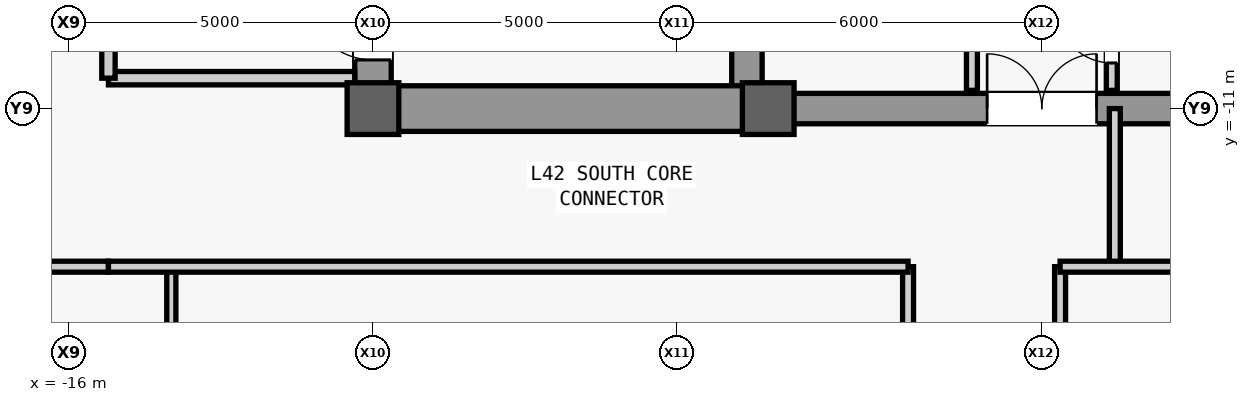
"""IFC4 building model, lengths in metres.
Left out: names, types, materials, properties, quantities, classifications, styles, units other than length and angle.
Written with IfcOpenShell. Run it as: python <this file> out.ifc"""

import sys

from ifc_helpers import new_model, si_unit, direction, frame, frame_2d, origin, origin_2d, place, context, subcontext, project, spatial, rectangle, extrude, source, transform, mapped, element, fill, save


model = new_model("IFC4")
c1 = context("Model", 3, precision=1e-05, world=origin(), true_north=direction((0.0, 1.0)))
c2 = subcontext(c1, "Body", "Model", "MODEL_VIEW")
j1 = project(units=[si_unit("LENGTHUNIT", "METRE"), si_unit("PLANEANGLEUNIT", "RADIAN")], contexts=[c1])
p1 = place(None, origin())
s1 = spatial("IfcSite", under=j1, at=p1, CompositionType="ELEMENT")
p2 = place(p1, origin())
s2 = spatial("IfcBuilding", under=s1, at=p2, CompositionType="ELEMENT")
p3 = place(p2, frame((0.0, 0.0, 183.1)))
s3 = spatial("IfcBuildingStorey", under=s2, at=p3, CompositionType="ELEMENT", Elevation=183.1)
m1 = source(origin(), c2, "Body", "SweptSolid", [
    extrude(rectangle(XDim=22.0, YDim=0.6, at=frame_2d((11.0, 0.0))), origin(), (0.0, 0.0, 1.0), 3.78),
])
p4 = place(p3, frame((-11.0, -11.0, 0.0), z_axis=(0.0, 0.0, 1.0), x_axis=(0.0, 1.0, 0.0)))
e1 = element("IfcWall", 1, at=p4, inside=s3, PredefinedType="SHEAR", context=c2, shape_type="MappedRepresentation", body=[
    mapped(m1, transform((0.0, 0.0, 0.0), scale=1.0)),
])
m2 = source(origin(), c2, "Body", "SweptSolid", [
    extrude(rectangle(XDim=1.1, YDim=2.2, at=frame_2d((0.55, 1.1))), frame((0.0, 0.31, 0.0), z_axis=(0.0, -1.0, 0.0), x_axis=(1.0, 0.0, 0.0)), (0.0, 0.0, 1.0), 0.62),
])
p5 = place(p4, frame((0.8, 0.0, 0.0)))
e2 = element("IfcOpeningElement", 2, at=p5, cuts=e1, PredefinedType="OPENING", context=c2, shape_type="MappedRepresentation", body=[
    mapped(m2, transform((0.0, 0.0, 0.0), scale=1.0)),
])
p6 = place(p4, frame((12.5, 0.0, 0.0)))
e3 = element("IfcOpeningElement", 3, at=p6, cuts=e1, PredefinedType="OPENING", context=c2, shape_type="MappedRepresentation", body=[
    mapped(m2, transform((0.0, 0.0, 0.0), scale=1.0)),
])
m3 = source(origin(), c2, "Body", "SweptSolid", [
    extrude(rectangle(XDim=0.9, YDim=2.15, at=frame_2d((0.45, 1.075))), frame((0.0, 0.31, 0.0), z_axis=(0.0, -1.0, 0.0), x_axis=(1.0, 0.0, 0.0)), (0.0, 0.0, 1.0), 0.62),
])
p7 = place(p4, frame((6.2, 0.0, 0.0)))
e4 = element("IfcOpeningElement", 4, at=p7, cuts=e1, PredefinedType="OPENING", context=c2, shape_type="MappedRepresentation", body=[
    mapped(m3, transform((0.0, 0.0, 0.0), scale=1.0)),
])
p8 = place(p4, frame((8.05, 0.0, 0.0)))
e5 = element("IfcOpeningElement", 5, at=p8, cuts=e1, PredefinedType="OPENING", context=c2, shape_type="MappedRepresentation", body=[
    mapped(m3, transform((0.0, 0.0, 0.0), scale=1.0)),
])
m4 = source(origin(), c2, "Body", "SweptSolid", [
    extrude(rectangle(XDim=1.3, YDim=2.3, at=frame_2d((0.65, 1.15))), frame((0.0, 0.31, 0.0), z_axis=(0.0, -1.0, 0.0), x_axis=(1.0, 0.0, 0.0)), (0.0, 0.0, 1.0), 0.62),
])
p9 = place(p4, frame((2.7, 0.0, 0.0)))
e6 = element("IfcOpeningElement", 6, at=p9, cuts=e1, PredefinedType="OPENING", context=c2, shape_type="MappedRepresentation", body=[
    mapped(m4, transform((0.0, 0.0, 0.0), scale=1.0)),
])
m5 = source(origin(), c2, "Body", "SweptSolid", [
    extrude(rectangle(XDim=21.4, YDim=0.5, at=frame_2d((10.7, 0.0))), origin(), (0.0, 0.0, 1.0), 3.78),
])
p10 = place(p3, frame((-4.85, -10.7, 0.0), z_axis=(0.0, 0.0, 1.0), x_axis=(0.0, 1.0, 0.0)))
e7 = element("IfcWall", 7, at=p10, inside=s3, PredefinedType="SHEAR", context=c2, shape_type="MappedRepresentation", body=[
    mapped(m5, transform((0.0, 0.0, 0.0), scale=1.0)),
])
m6 = source(origin(), c2, "Body", "SweptSolid", [
    extrude(rectangle(XDim=5.85, YDim=0.75, at=frame_2d((2.925, 0.0))), origin(), (0.0, 0.0, 1.0), 3.78),
])
p11 = place(p3, frame((-10.7, -11.0, 0.0), z_axis=(0.0, 0.0, 1.0), x_axis=(1.0, 0.0, 0.0)))
e8 = element("IfcWall", 8, at=p11, inside=s3, PredefinedType="SHEAR", context=c2, shape_type="MappedRepresentation", body=[
    mapped(m6, transform((0.0, 0.0, 0.0), scale=1.0)),
])
m7 = source(origin(), c2, "Body", "SweptSolid", [
    extrude(rectangle(XDim=9.2, YDim=0.5, at=frame_2d((4.6, 0.0))), origin(), (0.0, 0.0, 1.0), 3.78),
])
p12 = place(p3, frame((-4.6, -11.0, 0.0), z_axis=(0.0, 0.0, 1.0), x_axis=(1.0, 0.0, 0.0)))
e9 = element("IfcWall", 9, at=p12, inside=s3, PredefinedType="SHEAR", context=c2, shape_type="MappedRepresentation", body=[
    mapped(m7, transform((0.0, 0.0, 0.0), scale=1.0)),
])
m8 = source(origin(), c2, "Body", "SweptSolid", [
    extrude(rectangle(XDim=1.8, YDim=2.25, at=frame_2d((0.9, 1.125))), frame((0.0, 0.26, 0.0), z_axis=(0.0, -1.0, 0.0), x_axis=(1.0, 0.0, 0.0)), (0.0, 0.0, 1.0), 0.52),
])
p13 = place(p12, frame((3.7, 0.0, 0.0)))
e10 = element("IfcOpeningElement", 10, at=p13, cuts=e9, PredefinedType="OPENING", context=c2, shape_type="MappedRepresentation", body=[
    mapped(m8, transform((0.0, 0.0, 0.0), scale=1.0)),
])
m9 = source(origin(), c2, "Body", "SweptSolid", [
    extrude(rectangle(XDim=0.85, YDim=0.85, at=origin_2d()), origin(), (0.0, 0.0, 1.0), 4.0),
])
for number, where, z_axis, x_axis in (
    (11, (-11.0, -11.0, 0.0), (0.0, 0.0, 1.0), (1.0, 0.0, 0.0)),
    (12, (-4.5, -11.0, 0.0), (0.0, 0.0, 1.0), (1.0, 0.0, 0.0)),
):
    element("IfcColumn", number, at=place(p3, frame(where, z_axis=z_axis, x_axis=x_axis)), inside=s3, PredefinedType="COLUMN", context=c2, shape_type="MappedRepresentation", body=[
        mapped(m9, transform((0.0, 0.0, 0.0), scale=1.0)),
    ])
m10 = source(origin(), c2, "Body", "SweptSolid", [
    extrude(rectangle(XDim=4.05, YDim=0.22, at=frame_2d((2.025, 0.0))), origin(), (0.0, 0.0, 1.0), 3.78),
])
p14 = place(p3, frame((-15.35, -10.5, 0.0), z_axis=(0.0, 0.0, 1.0), x_axis=(1.0, 0.0, 0.0)))
e13 = element("IfcWall", 13, at=p14, inside=s3, PredefinedType="PARTITIONING", context=c2, shape_type="MappedRepresentation", body=[
    mapped(m10, transform((0.0, 0.0, 0.0), scale=1.0)),
])
m11 = source(origin(), c2, "Body", "SweptSolid", [
    extrude(rectangle(XDim=4.4, YDim=0.22, at=frame_2d((2.2, 0.0))), origin(), (0.0, 0.0, 1.0), 3.78),
])
p15 = place(p3, frame((-15.35, -10.5, 0.0), z_axis=(0.0, 0.0, 1.0), x_axis=(0.0, 1.0, 0.0)))
e14 = element("IfcWall", 14, at=p15, inside=s3, PredefinedType="PARTITIONING", context=c2, shape_type="MappedRepresentation", body=[
    mapped(m11, transform((0.0, 0.0, 0.0), scale=1.0)),
])
m12 = source(origin(), c2, "Body", "SweptSolid", [
    extrude(rectangle(XDim=1.2, YDim=2.2, at=frame_2d((0.6, 1.1))), frame((0.0, 0.12, 0.0), z_axis=(0.0, -1.0, 0.0), x_axis=(1.0, 0.0, 0.0)), (0.0, 0.0, 1.0), 0.24),
])
p16 = place(p15, frame((1.6, 0.0, 0.0)))
e15 = element("IfcOpeningElement", 15, at=p16, cuts=e14, PredefinedType="OPENING", context=c2, shape_type="MappedRepresentation", body=[
    mapped(m12, transform((0.0, 0.0, 0.0), scale=1.0)),
])
m13 = source(origin(), c2, "Body", "SweptSolid", [
    extrude(rectangle(XDim=5.4, YDim=0.18, at=frame_2d((2.7, 0.0))), origin(), (0.0, 0.0, 1.0), 3.78),
])
p17 = place(p3, frame((-1.15, -10.7, 0.0), z_axis=(0.0, 0.0, 1.0), x_axis=(0.0, 1.0, 0.0)))
e16 = element("IfcWall", 16, at=p17, inside=s3, PredefinedType="PARTITIONING", context=c2, shape_type="MappedRepresentation", body=[
    mapped(m13, transform((0.0, 0.0, 0.0), scale=1.0)),
])
m14 = source(origin(), c2, "Body", "SweptSolid", [
    extrude(rectangle(XDim=0.9, YDim=2.15, at=frame_2d((0.45, 1.075))), frame((0.0, 0.1, 0.0), z_axis=(0.0, -1.0, 0.0), x_axis=(1.0, 0.0, 0.0)), (0.0, 0.0, 1.0), 0.2),
])
p18 = place(p17, frame((2.25, 0.0, 0.0)))
e17 = element("IfcOpeningElement", 17, at=p18, cuts=e16, PredefinedType="OPENING", context=c2, shape_type="MappedRepresentation", body=[
    mapped(m14, transform((0.0, 0.0, 0.0), scale=1.0)),
])
p19 = place(p3, frame((1.15, -10.7, 0.0), z_axis=(0.0, 0.0, 1.0), x_axis=(0.0, 1.0, 0.0)))
e18 = element("IfcWall", 18, at=p19, inside=s3, PredefinedType="PARTITIONING", context=c2, shape_type="MappedRepresentation", body=[
    mapped(m13, transform((0.0, 0.0, 0.0), scale=1.0)),
])
p20 = place(p19, frame((0.45, 0.0, 0.0)))
e19 = element("IfcOpeningElement", 19, at=p20, cuts=e18, PredefinedType="OPENING", context=c2, shape_type="MappedRepresentation", body=[
    mapped(m14, transform((0.0, 0.0, 0.0), scale=1.0)),
])
p21 = place(p19, frame((2.25, 0.0, 0.0)))
e20 = element("IfcOpeningElement", 20, at=p21, cuts=e18, PredefinedType="OPENING", context=c2, shape_type="MappedRepresentation", body=[
    mapped(m14, transform((0.0, 0.0, 0.0), scale=1.0)),
])
p22 = place(p19, frame((4.05, 0.0, 0.0)))
e21 = element("IfcOpeningElement", 21, at=p22, cuts=e18, PredefinedType="OPENING", context=c2, shape_type="MappedRepresentation", body=[
    mapped(m14, transform((0.0, 0.0, 0.0), scale=1.0)),
])
m15 = source(origin(), c2, "Body", "SweptSolid", [
    extrude(rectangle(XDim=2.45, YDim=0.18, at=frame_2d((1.225, 0.0))), origin(), (0.0, 0.0, 1.0), 3.78),
])
p23 = place(p3, frame((-17.8, -13.6, 0.0), z_axis=(0.0, 0.0, 1.0), x_axis=(1.0, 0.0, 0.0)))
e22 = element("IfcWall", 22, at=p23, inside=s3, PredefinedType="PARTITIONING", context=c2, shape_type="MappedRepresentation", body=[
    mapped(m15, transform((0.0, 0.0, 0.0), scale=1.0)),
])
m16 = source(origin(), c2, "Body", "SweptSolid", [
    extrude(rectangle(XDim=2.6, YDim=0.18, at=frame_2d((1.3, 0.0))), origin(), (0.0, 0.0, 1.0), 3.78),
])
p24 = place(p3, frame((1.2, -13.6, 0.0), z_axis=(0.0, 0.0, 1.0), x_axis=(0.0, 1.0, 0.0)))
e23 = element("IfcWall", 23, at=p24, inside=s3, PredefinedType="PARTITIONING", context=c2, shape_type="MappedRepresentation", body=[
    mapped(m16, transform((0.0, 0.0, 0.0), scale=1.0)),
])
m17 = source(origin(), c2, "Body", "SweptSolid", [
    extrude(rectangle(XDim=16.4, YDim=0.15, at=frame_2d((8.2, 0.0))), origin(), (0.0, 0.0, 1.0), 3.78),
])
p25 = place(p3, frame((-14.316, -30.0, 0.0), z_axis=(0.0, 0.0, 1.0), x_axis=(0.0, 1.0, 0.0)))
e24 = element("IfcWall", 24, at=p25, inside=s3, PredefinedType="PARTITIONING", context=c2, shape_type="MappedRepresentation", body=[
    mapped(m17, transform((0.0, 0.0, 0.0), scale=1.0)),
])
m18 = source(origin(), c2, "Body", "SweptSolid", [
    extrude(rectangle(XDim=0.95, YDim=2.15, at=frame_2d((0.475, 1.075))), frame((0.0, 0.085, 0.0), z_axis=(0.0, -1.0, 0.0), x_axis=(1.0, 0.0, 0.0)), (0.0, 0.0, 1.0), 0.17),
])
p26 = place(p25, frame((11.825, 0.0, 0.0)))
e25 = element("IfcOpeningElement", 25, at=p26, cuts=e24, PredefinedType="OPENING", context=c2, shape_type="MappedRepresentation", body=[
    mapped(m18, transform((0.0, 0.0, 0.0), scale=1.0)),
])
m19 = source(origin(), c2, "Body", "SweptSolid", [
    extrude(rectangle(XDim=16.4, YDim=0.18, at=frame_2d((8.2, 0.0))), origin(), (0.0, 0.0, 1.0), 3.78),
])
p27 = place(p3, frame((-2.2, -30.0, 0.0), z_axis=(0.0, 0.0, 1.0), x_axis=(0.0, 1.0, 0.0)))
e26 = element("IfcWall", 26, at=p27, inside=s3, PredefinedType="PARTITIONING", context=c2, shape_type="MappedRepresentation", body=[
    mapped(m19, transform((0.0, 0.0, 0.0), scale=1.0)),
])
m20 = source(origin(), c2, "Body", "SweptSolid", [
    extrude(rectangle(XDim=1.05, YDim=2.2, at=frame_2d((0.525, 1.1))), frame((0.0, 0.1, 0.0), z_axis=(0.0, -1.0, 0.0), x_axis=(1.0, 0.0, 0.0)), (0.0, 0.0, 1.0), 0.2),
])
p28 = place(p27, frame((3.575, 0.0, 0.0)))
e27 = element("IfcOpeningElement", 27, at=p28, cuts=e26, PredefinedType="OPENING", context=c2, shape_type="MappedRepresentation", body=[
    mapped(m20, transform((0.0, 0.0, 0.0), scale=1.0)),
])
m21 = source(origin(), c2, "Body", "SweptSolid", [
    extrude(rectangle(XDim=13.15, YDim=0.18, at=frame_2d((6.575, 0.0))), origin(), (0.0, 0.0, 1.0), 3.78),
])
p29 = place(p3, frame((-15.35, -13.6, 0.0), z_axis=(0.0, 0.0, 1.0), x_axis=(1.0, 0.0, 0.0)))
e28 = element("IfcWall", 28, at=p29, inside=s3, PredefinedType="PARTITIONING", context=c2, shape_type="MappedRepresentation", body=[
    mapped(m21, transform((0.0, 0.0, 0.0), scale=1.0)),
])
m22 = source(origin(), c2, "Body", "SweptSolid", [
    extrude(rectangle(XDim=16.4, YDim=0.18, at=frame_2d((8.2, 0.0))), origin(), (0.0, 0.0, 1.0), 3.007),
])
p30 = place(p3, frame((0.3, -30.0, 0.0), z_axis=(0.0, 0.0, 1.0), x_axis=(0.0, 1.0, 0.0)))
e29 = element("IfcWall", 29, at=p30, inside=s3, PredefinedType="PARTITIONING", context=c2, shape_type="MappedRepresentation", body=[
    mapped(m22, transform((0.0, 0.0, 0.0), scale=1.0)),
])
p31 = place(p30, frame((3.575, 0.0, 0.0)))
e30 = element("IfcOpeningElement", 30, at=p31, cuts=e29, PredefinedType="OPENING", context=c2, shape_type="MappedRepresentation", body=[
    mapped(m20, transform((0.0, 0.0, 0.0), scale=1.0)),
])
m23 = source(origin(), c2, "Body", "SweptSolid", [
    extrude(rectangle(XDim=15.05, YDim=0.18, at=frame_2d((7.525, 0.0))), origin(), (0.0, 0.0, 1.0), 3.78),
])
p32 = place(p3, frame((0.3, -13.6, 0.0), z_axis=(0.0, 0.0, 1.0), x_axis=(1.0, 0.0, 0.0)))
e31 = element("IfcWall", 31, at=p32, inside=s3, PredefinedType="PARTITIONING", context=c2, shape_type="MappedRepresentation", body=[
    mapped(m23, transform((0.0, 0.0, 0.0), scale=1.0)),
])
m24 = source(origin(), c2, "Body", "SweptSolid", [
    extrude(rectangle(XDim=1.1, YDim=2.2, at=frame_2d((0.55, 1.1))), frame((0.0, 0.025, 0.0), z_axis=(0.0, -1.0, 0.0), x_axis=(1.0, 0.0, 0.0)), (0.0, 0.0, 1.0), 0.05),
])
p33 = place(p5, origin())
e32 = element("IfcDoor", 32, at=p33, inside=s3, OperationType="SINGLE_SWING_RIGHT", PredefinedType="DOOR", context=c2, shape_type="MappedRepresentation", body=[
    mapped(m24, transform((0.0, 0.0, 0.0), scale=1.0)),
])
fill(e2, e32)
m25 = source(origin(), c2, "Body", "SweptSolid", [
    extrude(rectangle(XDim=0.9, YDim=2.15, at=frame_2d((0.45, 1.075))), frame((0.0, 0.025, 0.0), z_axis=(0.0, -1.0, 0.0), x_axis=(1.0, 0.0, 0.0)), (0.0, 0.0, 1.0), 0.05),
])
p34 = place(p20, origin())
e33 = element("IfcDoor", 33, at=p34, inside=s3, OperationType="SINGLE_SWING_RIGHT", PredefinedType="DOOR", context=c2, shape_type="MappedRepresentation", body=[
    mapped(m25, transform((0.0, 0.0, 0.0), scale=1.0)),
])
fill(e19, e33)
m26 = source(origin(), c2, "Body", "SweptSolid", [
    extrude(rectangle(XDim=1.8, YDim=2.25, at=frame_2d((0.9, 1.125))), frame((0.0, 0.025, 0.0), z_axis=(0.0, -1.0, 0.0), x_axis=(1.0, 0.0, 0.0)), (0.0, 0.0, 1.0), 0.05),
])
p35 = place(p13, origin())
e34 = element("IfcDoor", 34, at=p35, inside=s3, OperationType="SINGLE_SWING_LEFT", PredefinedType="DOOR", context=c2, shape_type="MappedRepresentation", body=[
    mapped(m26, transform((0.0, 0.0, 0.0), scale=1.0)),
])
fill(e10, e34)
save(model, sys.argv[1])
